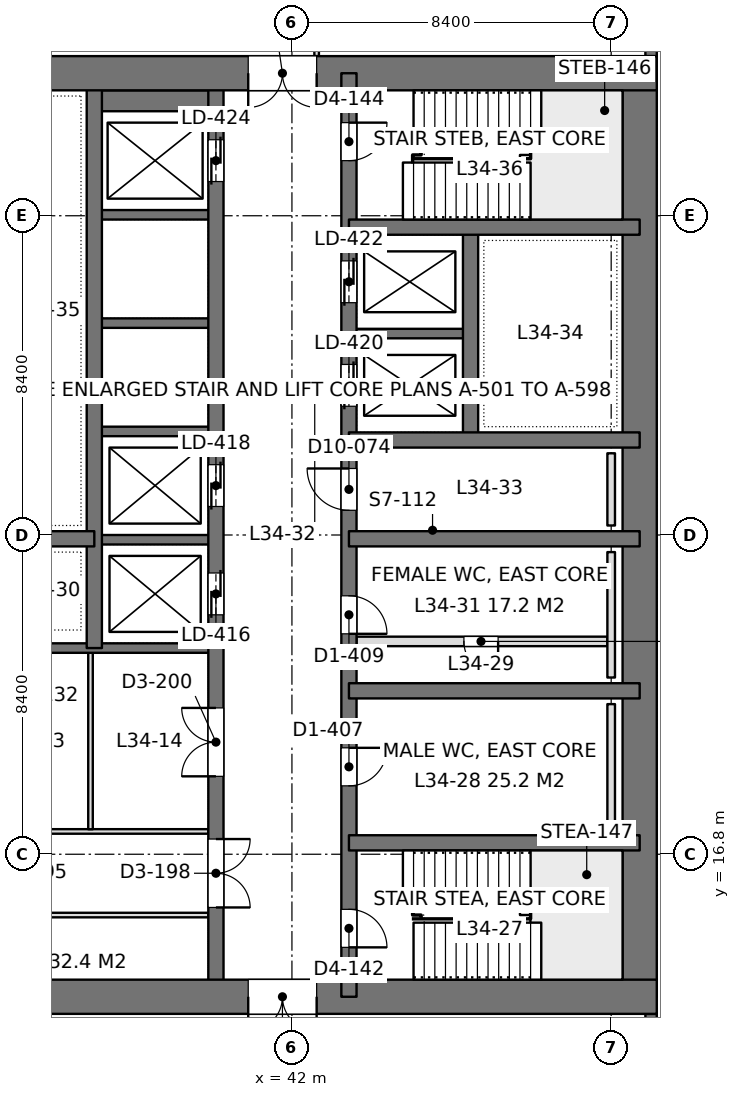
"""IFC4 building model, lengths in metres.
Left out: names, types, materials, properties, quantities, classifications, styles, units other than length and angle.
Written with IfcOpenShell. Run it as: python <this file> out.ifc"""

import sys

from ifc_helpers import new_model, si_unit, direction, frame, frame_2d, origin, place, context, subcontext, project, spatial, rectangle, extrude, element, fill, save


model = new_model("IFC4")
c1 = context("Model", 3, precision=1e-05, world=origin(), true_north=direction((0.0, 1.0)))
c2 = subcontext(c1, "Body", "Model", "MODEL_VIEW")
j1 = project(units=[si_unit("LENGTHUNIT", "METRE"), si_unit("PLANEANGLEUNIT", "RADIAN")], contexts=[c1])
p1 = place(None, origin())
s1 = spatial("IfcSite", under=j1, at=p1, CompositionType="ELEMENT")
p2 = place(p1, origin())
s2 = spatial("IfcBuilding", under=s1, at=p2, CompositionType="ELEMENT")
p3 = place(p2, frame((0.0, 0.0, 151.2)))
s3 = spatial("IfcBuildingStorey", under=s2, at=p3, CompositionType="ELEMENT", Elevation=151.2)
p4 = place(p3, frame((33.6, 13.05, 0.0), z_axis=(0.0, 0.0, 1.0), x_axis=(1.0, 0.0, 0.0)))
e1 = element("IfcWall", 1, at=p4, inside=s3, PredefinedType="SHEAR", context=c2, shape_type="SweptSolid", body=[
    extrude(rectangle(XDim=18.0, YDim=0.9, at=frame_2d((9.0, 0.0))), origin(), (0.0, 0.0, 1.0), 4.2),
])
p5 = place(p4, frame((7.25, 0.0, 0.0)))
e2 = element("IfcOpeningElement", 2, at=p5, cuts=e1, PredefinedType="OPENING", context=c2, shape_type="SweptSolid", body=[
    extrude(rectangle(XDim=1.8, YDim=2.4, at=frame_2d((0.9, 1.2))), frame((0.0, 0.46, 0.0), z_axis=(0.0, -1.0, 0.0), x_axis=(1.0, 0.0, 0.0)), (0.0, 0.0, 1.0), 0.92),
])
p6 = place(p3, frame((33.6, 37.35, 0.0), z_axis=(0.0, 0.0, 1.0), x_axis=(1.0, 0.0, 0.0)))
e3 = element("IfcWall", 3, at=p6, inside=s3, PredefinedType="SHEAR", context=c2, shape_type="SweptSolid", body=[
    extrude(rectangle(XDim=18.0, YDim=0.9, at=frame_2d((9.0, 0.0))), origin(), (0.0, 0.0, 1.0), 4.2),
])
p7 = place(p6, frame((7.25, 0.0, 0.0)))
e4 = element("IfcOpeningElement", 4, at=p7, cuts=e3, PredefinedType="OPENING", context=c2, shape_type="SweptSolid", body=[
    extrude(rectangle(XDim=1.8, YDim=2.4, at=frame_2d((0.9, 1.2))), frame((0.0, 0.46, 0.0), z_axis=(0.0, -1.0, 0.0), x_axis=(1.0, 0.0, 0.0)), (0.0, 0.0, 1.0), 0.92),
])
p8 = place(p3, frame((51.15, 13.05, 0.0), z_axis=(0.0, 0.0, 1.0), x_axis=(0.0, 1.0, 0.0)))
e5 = element("IfcWall", 5, at=p8, inside=s3, PredefinedType="SHEAR", context=c2, shape_type="SweptSolid", body=[
    extrude(rectangle(XDim=24.3, YDim=0.9, at=frame_2d((12.15, 0.0))), origin(), (0.0, 0.0, 1.0), 4.2),
])
p9 = place(p3, frame((43.5, 13.05, 0.0), z_axis=(0.0, 0.0, 1.0), x_axis=(0.0, 1.0, 0.0)))
e6 = element("IfcWall", 6, at=p9, inside=s3, PredefinedType="SHEAR", context=c2, shape_type="SweptSolid", body=[
    extrude(rectangle(XDim=24.3, YDim=0.4, at=frame_2d((12.15, 0.0))), origin(), (0.0, 0.0, 1.0), 4.2),
])
p10 = place(p9, frame((1.3, 0.0, 0.0)))
e7 = element("IfcOpeningElement", 7, at=p10, cuts=e6, PredefinedType="OPENING", context=c2, shape_type="SweptSolid", body=[
    extrude(rectangle(XDim=1.0, YDim=2.2, at=frame_2d((0.5, 1.1))), frame((0.0, 0.21, 0.0), z_axis=(0.0, -1.0, 0.0), x_axis=(1.0, 0.0, 0.0)), (0.0, 0.0, 1.0), 0.42),
])
p11 = place(p9, frame((22.0, 0.0, 0.0)))
e8 = element("IfcOpeningElement", 8, at=p11, cuts=e6, PredefinedType="OPENING", context=c2, shape_type="SweptSolid", body=[
    extrude(rectangle(XDim=1.0, YDim=2.2, at=frame_2d((0.5, 1.1))), frame((0.0, 0.21, 0.0), z_axis=(0.0, -1.0, 0.0), x_axis=(1.0, 0.0, 0.0)), (0.0, 0.0, 1.0), 0.42),
])
p12 = place(p9, frame((5.55, 0.0, 0.0)))
e9 = element("IfcOpeningElement", 9, at=p12, cuts=e6, PredefinedType="OPENING", context=c2, shape_type="SweptSolid", body=[
    extrude(rectangle(XDim=1.0, YDim=2.2, at=frame_2d((0.5, 1.1))), frame((0.0, 0.21, 0.0), z_axis=(0.0, -1.0, 0.0), x_axis=(1.0, 0.0, 0.0)), (0.0, 0.0, 1.0), 0.42),
])
p13 = place(p9, frame((9.55, 0.0, 0.0)))
e10 = element("IfcOpeningElement", 10, at=p13, cuts=e6, PredefinedType="OPENING", context=c2, shape_type="SweptSolid", body=[
    extrude(rectangle(XDim=1.0, YDim=2.2, at=frame_2d((0.5, 1.1))), frame((0.0, 0.21, 0.0), z_axis=(0.0, -1.0, 0.0), x_axis=(1.0, 0.0, 0.0)), (0.0, 0.0, 1.0), 0.42),
])
p14 = place(p9, frame((12.8, 0.0, 0.0)))
e11 = element("IfcOpeningElement", 11, at=p14, cuts=e6, PredefinedType="OPENING", context=c2, shape_type="SweptSolid", body=[
    extrude(rectangle(XDim=1.1, YDim=2.2, at=frame_2d((0.55, 1.1))), frame((0.0, 0.21, 0.0), z_axis=(0.0, -1.0, 0.0), x_axis=(1.0, 0.0, 0.0)), (0.0, 0.0, 1.0), 0.42),
])
p15 = place(p9, frame((15.538, 0.0, 0.0)))
e12 = element("IfcOpeningElement", 12, at=p15, cuts=e6, PredefinedType="OPENING", context=c2, shape_type="SweptSolid", body=[
    extrude(rectangle(XDim=1.1, YDim=2.2, at=frame_2d((0.55, 1.1))), frame((0.0, 0.21, 0.0), z_axis=(0.0, -1.0, 0.0), x_axis=(1.0, 0.0, 0.0)), (0.0, 0.0, 1.0), 0.42),
])
p16 = place(p9, frame((18.262, 0.0, 0.0)))
e13 = element("IfcOpeningElement", 13, at=p16, cuts=e6, PredefinedType="OPENING", context=c2, shape_type="SweptSolid", body=[
    extrude(rectangle(XDim=1.1, YDim=2.2, at=frame_2d((0.55, 1.1))), frame((0.0, 0.21, 0.0), z_axis=(0.0, -1.0, 0.0), x_axis=(1.0, 0.0, 0.0)), (0.0, 0.0, 1.0), 0.42),
])
p17 = place(p3, frame((40.0, 13.05, 0.0), z_axis=(0.0, 0.0, 1.0), x_axis=(0.0, 1.0, 0.0)))
e14 = element("IfcWall", 14, at=p17, inside=s3, PredefinedType="SHEAR", context=c2, shape_type="SweptSolid", body=[
    extrude(rectangle(XDim=24.3, YDim=0.4, at=frame_2d((12.15, 0.0))), origin(), (0.0, 0.0, 1.0), 4.2),
])
p18 = place(p17, frame((10.05, 0.0, 0.0)))
e15 = element("IfcOpeningElement", 15, at=p18, cuts=e14, PredefinedType="OPENING", context=c2, shape_type="SweptSolid", body=[
    extrude(rectangle(XDim=1.1, YDim=2.2, at=frame_2d((0.55, 1.1))), frame((0.0, 0.21, 0.0), z_axis=(0.0, -1.0, 0.0), x_axis=(1.0, 0.0, 0.0)), (0.0, 0.0, 1.0), 0.42),
])
p19 = place(p17, frame((12.9, 0.0, 0.0)))
e16 = element("IfcOpeningElement", 16, at=p19, cuts=e14, PredefinedType="OPENING", context=c2, shape_type="SweptSolid", body=[
    extrude(rectangle(XDim=1.1, YDim=2.2, at=frame_2d((0.55, 1.1))), frame((0.0, 0.21, 0.0), z_axis=(0.0, -1.0, 0.0), x_axis=(1.0, 0.0, 0.0)), (0.0, 0.0, 1.0), 0.42),
])
p20 = place(p17, frame((21.45, 0.0, 0.0)))
e17 = element("IfcOpeningElement", 17, at=p20, cuts=e14, PredefinedType="OPENING", context=c2, shape_type="SweptSolid", body=[
    extrude(rectangle(XDim=1.1, YDim=2.2, at=frame_2d((0.55, 1.1))), frame((0.0, 0.21, 0.0), z_axis=(0.0, -1.0, 0.0), x_axis=(1.0, 0.0, 0.0)), (0.0, 0.0, 1.0), 0.42),
])
p21 = place(p17, frame((2.35, 0.0, 0.0)))
e18 = element("IfcOpeningElement", 18, at=p21, cuts=e14, PredefinedType="OPENING", context=c2, shape_type="SweptSolid", body=[
    extrude(rectangle(XDim=1.8, YDim=2.4, at=frame_2d((0.9, 1.2))), frame((0.0, 0.21, 0.0), z_axis=(0.0, -1.0, 0.0), x_axis=(1.0, 0.0, 0.0)), (0.0, 0.0, 1.0), 0.42),
])
p22 = place(p17, frame((5.8, 0.0, 0.0)))
e19 = element("IfcOpeningElement", 19, at=p22, cuts=e14, PredefinedType="OPENING", context=c2, shape_type="SweptSolid", body=[
    extrude(rectangle(XDim=1.8, YDim=2.4, at=frame_2d((0.9, 1.2))), frame((0.0, 0.21, 0.0), z_axis=(0.0, -1.0, 0.0), x_axis=(1.0, 0.0, 0.0)), (0.0, 0.0, 1.0), 0.42),
])
p23 = place(p3, frame((36.8, 22.225, 0.0), z_axis=(0.0, 0.0, 1.0), x_axis=(0.0, 1.0, 0.0)))
e20 = element("IfcWall", 20, at=p23, inside=s3, PredefinedType="SHEAR", context=c2, shape_type="SweptSolid", body=[
    extrude(rectangle(XDim=15.125, YDim=0.4, at=frame_2d((7.562, 0.0))), origin(), (0.0, 0.0, 1.0), 4.2),
])
for number, where, z_axis, x_axis in (
    (21, (51.15, 17.1, 0.0), (0.0, 0.0, 1.0), (-1.0, 0.0, 0.0)),
    (22, (51.15, 21.1, 0.0), (0.0, 0.0, 1.0), (-1.0, 0.0, 0.0)),
    (23, (51.15, 25.1, 0.0), (0.0, 0.0, 1.0), (-1.0, 0.0, 0.0)),
    (24, (51.15, 27.7, 0.0), (0.0, 0.0, 1.0), (-1.0, 0.0, 0.0)),
    (25, (51.15, 33.3, 0.0), (0.0, 0.0, 1.0), (-1.0, 0.0, 0.0)),
):
    element("IfcWall", number, at=place(p3, frame(where, z_axis=z_axis, x_axis=x_axis)), inside=s3, PredefinedType="SHEAR", context=c2, shape_type="SweptSolid", body=[
        extrude(rectangle(XDim=7.65, YDim=0.4, at=frame_2d((3.825, 0.0))), origin(), (0.0, 0.0, 1.0), 4.2),
    ])
p24 = place(p3, frame((46.7, 27.7, 0.0), z_axis=(0.0, 0.0, 1.0), x_axis=(0.0, 1.0, 0.0)))
e26 = element("IfcWall", 26, at=p24, inside=s3, PredefinedType="SHEAR", context=c2, shape_type="SweptSolid", body=[
    extrude(rectangle(XDim=5.6, YDim=0.4, at=frame_2d((2.8, 0.0))), origin(), (0.0, 0.0, 1.0), 4.2),
])
p25 = place(p3, frame((46.7, 30.5, 0.0), z_axis=(0.0, 0.0, 1.0), x_axis=(-1.0, 0.0, 0.0)))
e27 = element("IfcWall", 27, at=p25, inside=s3, PredefinedType="SHEAR", context=c2, shape_type="SweptSolid", body=[
    extrude(rectangle(XDim=3.2, YDim=0.25, at=frame_2d((1.6, 0.0))), origin(), (0.0, 0.0, 1.0), 4.2),
])
p26 = place(p3, frame((36.8, 25.1, 0.0), z_axis=(0.0, 0.0, 1.0), x_axis=(-1.0, 0.0, 0.0)))
e28 = element("IfcWall", 28, at=p26, inside=s3, PredefinedType="SHEAR", context=c2, shape_type="SweptSolid", body=[
    extrude(rectangle(XDim=2.75, YDim=0.4, at=frame_2d((1.375, 0.0))), origin(), (0.0, 0.0, 1.0), 4.2),
])
p27 = place(p3, frame((40.0, 22.225, 0.0), z_axis=(0.0, 0.0, 1.0), x_axis=(-1.0, 0.0, 0.0)))
e29 = element("IfcWall", 29, at=p27, inside=s3, PredefinedType="SHEAR", context=c2, shape_type="SweptSolid", body=[
    extrude(rectangle(XDim=5.95, YDim=0.25, at=frame_2d((2.975, 0.0))), origin(), (0.0, 0.0, 1.0), 4.2),
])
for number, where, z_axis, x_axis in (
    (30, (40.0, 25.075, 0.0), (0.0, 0.0, 1.0), (-1.0, 0.0, 0.0)),
    (31, (40.0, 27.925, 0.0), (0.0, 0.0, 1.0), (-1.0, 0.0, 0.0)),
    (32, (40.0, 30.775, 0.0), (0.0, 0.0, 1.0), (-1.0, 0.0, 0.0)),
    (33, (40.0, 33.625, 0.0), (0.0, 0.0, 1.0), (-1.0, 0.0, 0.0)),
):
    element("IfcWall", number, at=place(p3, frame(where, z_axis=z_axis, x_axis=x_axis)), inside=s3, PredefinedType="SHEAR", context=c2, shape_type="SweptSolid", body=[
        extrude(rectangle(XDim=3.2, YDim=0.25, at=frame_2d((1.6, 0.0))), origin(), (0.0, 0.0, 1.0), 4.2),
    ])
p28 = place(p3, frame((40.0, 36.625, 0.0), z_axis=(0.0, 0.0, 1.0), x_axis=(-1.0, 0.0, 0.0)))
e34 = element("IfcWall", 34, at=p28, inside=s3, PredefinedType="SHEAR", context=c2, shape_type="SweptSolid", body=[
    extrude(rectangle(XDim=3.2, YDim=0.55, at=frame_2d((1.6, 0.0))), origin(), (0.0, 0.0, 1.0), 4.2),
])
p29 = place(p3, frame((51.45, 42.0, 0.0), z_axis=(0.0, 0.0, 1.0), x_axis=(0.0, -1.0, 0.0)))
e35 = element("IfcWall", 35, at=p29, inside=s3, PredefinedType="SOLIDWALL", context=c2, shape_type="SweptSolid", body=[
    extrude(rectangle(XDim=4.2, YDim=0.3, at=frame_2d((2.1, 0.0))), origin(), (0.0, 0.0, 1.0), 4.05),
])
p30 = place(p29, frame((0.9, 0.0, 0.9)))
e36 = element("IfcOpeningElement", 36, at=p30, cuts=e35, PredefinedType="OPENING", context=c2, shape_type="SweptSolid", body=[
    extrude(rectangle(XDim=2.4, YDim=1.9, at=frame_2d((1.2, 0.95))), frame((0.0, 0.16, 0.0), z_axis=(0.0, -1.0, 0.0), x_axis=(1.0, 0.0, 0.0)), (0.0, 0.0, 1.0), 0.32),
])
p31 = place(p3, frame((51.45, 12.6, 0.0), z_axis=(0.0, 0.0, 1.0), x_axis=(0.0, -1.0, 0.0)))
e37 = element("IfcWall", 37, at=p31, inside=s3, PredefinedType="SOLIDWALL", context=c2, shape_type="SweptSolid", body=[
    extrude(rectangle(XDim=4.2, YDim=0.3, at=frame_2d((2.1, 0.0))), origin(), (0.0, 0.0, 1.0), 4.05),
])
p32 = place(p31, frame((0.9, 0.0, 0.9)))
e38 = element("IfcOpeningElement", 38, at=p32, cuts=e37, PredefinedType="OPENING", context=c2, shape_type="SweptSolid", body=[
    extrude(rectangle(XDim=2.4, YDim=1.9, at=frame_2d((1.2, 0.95))), frame((0.0, 0.16, 0.0), z_axis=(0.0, -1.0, 0.0), x_axis=(1.0, 0.0, 0.0)), (0.0, 0.0, 1.0), 0.32),
])
p33 = place(p3, frame((33.898, 17.4, 0.0), z_axis=(0.0, 0.0, 1.0), x_axis=(1.0, 0.0, 0.0)))
e39 = element("IfcWall", 39, at=p33, inside=s3, PredefinedType="PARTITIONING", context=c2, shape_type="SweptSolid", body=[
    extrude(rectangle(XDim=5.904, YDim=0.12, at=frame_2d((2.952, 0.0))), origin(), (0.0, 0.0, 1.0), 3.55),
])
p34 = place(p33, frame((0.752, 0.0, 0.0)))
e40 = element("IfcOpeningElement", 40, at=p34, cuts=e39, PredefinedType="OPENING", context=c2, shape_type="SweptSolid", body=[
    extrude(rectangle(XDim=1.0, YDim=2.4, at=frame_2d((0.5, 1.2))), frame((0.0, 0.07, 0.0), z_axis=(0.0, -1.0, 0.0), x_axis=(1.0, 0.0, 0.0)), (0.0, 0.0, 1.0), 0.14),
])
p35 = place(p3, frame((36.7, 17.458, 0.0), z_axis=(0.0, 0.0, 1.0), x_axis=(0.0, 1.0, 0.0)))
e41 = element("IfcWall", 41, at=p35, inside=s3, PredefinedType="PARTITIONING", context=c2, shape_type="SweptSolid", body=[
    extrude(rectangle(XDim=4.644, YDim=0.12, at=frame_2d((2.322, 0.0))), origin(), (0.0, 0.0, 1.0), 3.6),
])
p36 = place(p3, frame((33.598, 15.2, 0.0), z_axis=(0.0, 0.0, 1.0), x_axis=(1.0, 0.0, 0.0)))
e42 = element("IfcWall", 42, at=p36, inside=s3, PredefinedType="PARTITIONING", context=c2, shape_type="SweptSolid", body=[
    extrude(rectangle(XDim=6.204, YDim=0.12, at=frame_2d((3.102, 0.0))), origin(), (0.0, 0.0, 1.0), 3.55),
])
p37 = place(p3, frame((42.65, 37.8, 0.0), z_axis=(0.0, 0.0, 1.0), x_axis=(0.0, 1.0, 0.0)))
e43 = element("IfcWall", 43, at=p37, inside=s3, PredefinedType="PARTITIONING", context=c2, shape_type="SweptSolid", body=[
    extrude(rectangle(XDim=2.0, YDim=0.12, at=frame_2d((1.0, 0.0))), origin(), (0.0, 0.0, 1.0), 4.05),
])
p38 = place(p3, frame((43.7, 22.4, 0.0), z_axis=(0.0, 0.0, 1.0), x_axis=(1.0, 0.0, 0.0)))
e44 = element("IfcWall", 44, at=p38, inside=s3, PredefinedType="PARTITIONING", context=c2, shape_type="SweptSolid", body=[
    extrude(rectangle(XDim=6.6, YDim=0.25, at=frame_2d((3.3, 0.0))), origin(), (0.0, 0.0, 1.0), 4.0),
])
p39 = place(p38, frame((2.825, 0.0, 0.0)))
e45 = element("IfcOpeningElement", 45, at=p39, cuts=e44, PredefinedType="OPENING", context=c2, shape_type="SweptSolid", body=[
    extrude(rectangle(XDim=0.9, YDim=2.2, at=frame_2d((0.45, 1.1))), frame((0.0, 0.135, 0.0), z_axis=(0.0, -1.0, 0.0), x_axis=(1.0, 0.0, 0.0)), (0.0, 0.0, 1.0), 0.27),
])
for number, where, z_axis, x_axis in (
    (46, (50.4, 17.45, 0.0), (0.0, 0.0, 1.0), (0.0, 1.0, 0.0)),
    (47, (50.4, 21.45, 0.0), (0.0, 0.0, 1.0), (0.0, 1.0, 0.0)),
):
    element("IfcWall", number, at=place(p3, frame(where, z_axis=z_axis, x_axis=x_axis)), inside=s3, PredefinedType="PLUMBINGWALL", context=c2, shape_type="SweptSolid", body=[
        extrude(rectangle(XDim=3.3, YDim=0.2, at=frame_2d((1.65, 0.0))), origin(), (0.0, 0.0, 1.0), 1.2),
    ])
p40 = place(p3, frame((50.4, 25.45, 0.0), z_axis=(0.0, 0.0, 1.0), x_axis=(0.0, 1.0, 0.0)))
e48 = element("IfcWall", 48, at=p40, inside=s3, PredefinedType="PLUMBINGWALL", context=c2, shape_type="SweptSolid", body=[
    extrude(rectangle(XDim=1.9, YDim=0.2, at=frame_2d((0.95, 0.0))), origin(), (0.0, 0.0, 1.0), 1.2),
])
p41 = place(p5, frame((1.8, 0.0, 0.0), z_axis=(0.0, 0.0, 1.0), x_axis=(-1.0, 0.0, 0.0)))
e49 = element("IfcDoor", 49, at=p41, inside=s3, OperationType="DOUBLE_DOOR_SINGLE_SWING", PredefinedType="DOOR", context=c2, shape_type="SweptSolid", body=[
    extrude(rectangle(XDim=1.8, YDim=2.4, at=frame_2d((0.9, 1.2))), frame((0.0, 0.025, 0.0), z_axis=(0.0, -1.0, 0.0), x_axis=(1.0, 0.0, 0.0)), (0.0, 0.0, 1.0), 0.05),
])
fill(e2, e49)
p42 = place(p7, frame((1.8, 0.0, 0.0), z_axis=(0.0, 0.0, 1.0), x_axis=(-1.0, 0.0, 0.0)))
e50 = element("IfcDoor", 50, at=p42, inside=s3, OperationType="DOUBLE_DOOR_SINGLE_SWING", PredefinedType="DOOR", context=c2, shape_type="SweptSolid", body=[
    extrude(rectangle(XDim=1.8, YDim=2.4, at=frame_2d((0.9, 1.2))), frame((0.0, 0.025, 0.0), z_axis=(0.0, -1.0, 0.0), x_axis=(1.0, 0.0, 0.0)), (0.0, 0.0, 1.0), 0.05),
])
fill(e4, e50)
p43 = place(p10, frame((1.0, 0.0, 0.0), z_axis=(0.0, 0.0, 1.0), x_axis=(-1.0, 0.0, 0.0)))
e51 = element("IfcDoor", 51, at=p43, inside=s3, OperationType="SINGLE_SWING_RIGHT", PredefinedType="DOOR", context=c2, shape_type="SweptSolid", body=[
    extrude(rectangle(XDim=1.0, YDim=2.2, at=frame_2d((0.5, 1.1))), frame((0.0, 0.025, 0.0), z_axis=(0.0, -1.0, 0.0), x_axis=(1.0, 0.0, 0.0)), (0.0, 0.0, 1.0), 0.05),
])
fill(e7, e51)
p44 = place(p11, frame((1.0, 0.0, 0.0), z_axis=(0.0, 0.0, 1.0), x_axis=(-1.0, 0.0, 0.0)))
e52 = element("IfcDoor", 52, at=p44, inside=s3, OperationType="SINGLE_SWING_LEFT", PredefinedType="DOOR", context=c2, shape_type="SweptSolid", body=[
    extrude(rectangle(XDim=1.0, YDim=2.2, at=frame_2d((0.5, 1.1))), frame((0.0, 0.025, 0.0), z_axis=(0.0, -1.0, 0.0), x_axis=(1.0, 0.0, 0.0)), (0.0, 0.0, 1.0), 0.05),
])
fill(e8, e52)
p45 = place(p12, frame((1.0, 0.0, 0.0), z_axis=(0.0, 0.0, 1.0), x_axis=(-1.0, 0.0, 0.0)))
e53 = element("IfcDoor", 53, at=p45, inside=s3, OperationType="SINGLE_SWING_LEFT", PredefinedType="DOOR", context=c2, shape_type="SweptSolid", body=[
    extrude(rectangle(XDim=1.0, YDim=2.2, at=frame_2d((0.5, 1.1))), frame((0.0, 0.025, 0.0), z_axis=(0.0, -1.0, 0.0), x_axis=(1.0, 0.0, 0.0)), (0.0, 0.0, 1.0), 0.05),
])
fill(e9, e53)
p46 = place(p13, frame((1.0, 0.0, 0.0), z_axis=(0.0, 0.0, 1.0), x_axis=(-1.0, 0.0, 0.0)))
e54 = element("IfcDoor", 54, at=p46, inside=s3, OperationType="SINGLE_SWING_RIGHT", PredefinedType="DOOR", context=c2, shape_type="SweptSolid", body=[
    extrude(rectangle(XDim=1.0, YDim=2.2, at=frame_2d((0.5, 1.1))), frame((0.0, 0.025, 0.0), z_axis=(0.0, -1.0, 0.0), x_axis=(1.0, 0.0, 0.0)), (0.0, 0.0, 1.0), 0.05),
])
fill(e10, e54)
p47 = place(p14, origin())
e55 = element("IfcDoor", 55, at=p47, inside=s3, OperationType="SINGLE_SWING_RIGHT", PredefinedType="DOOR", context=c2, shape_type="SweptSolid", body=[
    extrude(rectangle(XDim=1.1, YDim=2.2, at=frame_2d((0.55, 1.1))), frame((0.0, 0.025, 0.0), z_axis=(0.0, -1.0, 0.0), x_axis=(1.0, 0.0, 0.0)), (0.0, 0.0, 1.0), 0.05),
])
fill(e11, e55)
p48 = place(p18, origin())
e56 = element("IfcDoor", 56, at=p48, inside=s3, OperationType="DOUBLE_DOOR_SLIDING", PredefinedType="DOOR", context=c2, shape_type="SweptSolid", body=[
    extrude(rectangle(XDim=1.1, YDim=2.2, at=frame_2d((0.55, 1.1))), frame((0.0, 0.025, 0.0), z_axis=(0.0, -1.0, 0.0), x_axis=(1.0, 0.0, 0.0)), (0.0, 0.0, 1.0), 0.05),
])
fill(e15, e56)
p49 = place(p19, origin())
e57 = element("IfcDoor", 57, at=p49, inside=s3, OperationType="DOUBLE_DOOR_SLIDING", PredefinedType="DOOR", context=c2, shape_type="SweptSolid", body=[
    extrude(rectangle(XDim=1.1, YDim=2.2, at=frame_2d((0.55, 1.1))), frame((0.0, 0.025, 0.0), z_axis=(0.0, -1.0, 0.0), x_axis=(1.0, 0.0, 0.0)), (0.0, 0.0, 1.0), 0.05),
])
fill(e16, e57)
p50 = place(p20, origin())
e58 = element("IfcDoor", 58, at=p50, inside=s3, OperationType="DOUBLE_DOOR_SLIDING", PredefinedType="DOOR", context=c2, shape_type="SweptSolid", body=[
    extrude(rectangle(XDim=1.1, YDim=2.2, at=frame_2d((0.55, 1.1))), frame((0.0, 0.025, 0.0), z_axis=(0.0, -1.0, 0.0), x_axis=(1.0, 0.0, 0.0)), (0.0, 0.0, 1.0), 0.05),
])
fill(e17, e58)
p51 = place(p15, origin())
e59 = element("IfcDoor", 59, at=p51, inside=s3, OperationType="DOUBLE_DOOR_SLIDING", PredefinedType="DOOR", context=c2, shape_type="SweptSolid", body=[
    extrude(rectangle(XDim=1.1, YDim=2.2, at=frame_2d((0.55, 1.1))), frame((0.0, 0.025, 0.0), z_axis=(0.0, -1.0, 0.0), x_axis=(1.0, 0.0, 0.0)), (0.0, 0.0, 1.0), 0.05),
])
fill(e12, e59)
p52 = place(p16, origin())
e60 = element("IfcDoor", 60, at=p52, inside=s3, OperationType="DOUBLE_DOOR_SLIDING", PredefinedType="DOOR", context=c2, shape_type="SweptSolid", body=[
    extrude(rectangle(XDim=1.1, YDim=2.2, at=frame_2d((0.55, 1.1))), frame((0.0, 0.025, 0.0), z_axis=(0.0, -1.0, 0.0), x_axis=(1.0, 0.0, 0.0)), (0.0, 0.0, 1.0), 0.05),
])
fill(e13, e60)
p53 = place(p21, frame((1.8, 0.0, 0.0), z_axis=(0.0, 0.0, 1.0), x_axis=(-1.0, 0.0, 0.0)))
e61 = element("IfcDoor", 61, at=p53, inside=s3, OperationType="DOUBLE_DOOR_SINGLE_SWING", PredefinedType="DOOR", context=c2, shape_type="SweptSolid", body=[
    extrude(rectangle(XDim=1.8, YDim=2.4, at=frame_2d((0.9, 1.2))), frame((0.0, 0.025, 0.0), z_axis=(0.0, -1.0, 0.0), x_axis=(1.0, 0.0, 0.0)), (0.0, 0.0, 1.0), 0.05),
])
fill(e18, e61)
p54 = place(p22, origin())
e62 = element("IfcDoor", 62, at=p54, inside=s3, OperationType="DOUBLE_DOOR_SINGLE_SWING", PredefinedType="DOOR", context=c2, shape_type="SweptSolid", body=[
    extrude(rectangle(XDim=1.8, YDim=2.4, at=frame_2d((0.9, 1.2))), frame((0.0, 0.025, 0.0), z_axis=(0.0, -1.0, 0.0), x_axis=(1.0, 0.0, 0.0)), (0.0, 0.0, 1.0), 0.05),
])
fill(e19, e62)
p55 = place(p39, frame((0.9, 0.0, 0.0), z_axis=(0.0, 0.0, 1.0), x_axis=(-1.0, 0.0, 0.0)))
e63 = element("IfcDoor", 63, at=p55, inside=s3, OperationType="SINGLE_SWING_LEFT", PredefinedType="DOOR", context=c2, shape_type="SweptSolid", body=[
    extrude(rectangle(XDim=0.9, YDim=2.2, at=frame_2d((0.45, 1.1))), frame((0.0, 0.025, 0.0), z_axis=(0.0, -1.0, 0.0), x_axis=(1.0, 0.0, 0.0)), (0.0, 0.0, 1.0), 0.05),
])
fill(e45, e63)
save(model, sys.argv[1])
